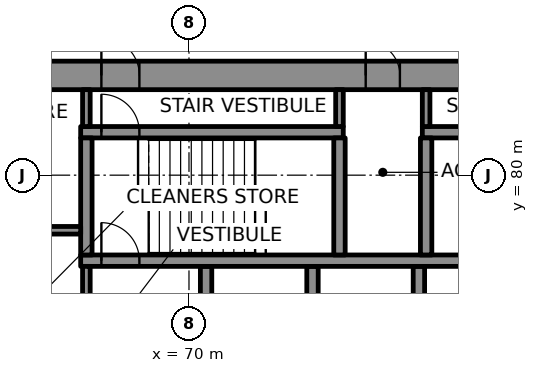
"""IFC4 building model, lengths in metres.
Left out: names, types, materials, properties, quantities, classifications, styles, units other than length and angle.
Written with IfcOpenShell. Run it as: python <this file> out.ifc"""

import sys

from ifc_helpers import new_model, si_unit, direction, frame, frame_2d, origin, place, context, subcontext, project, spatial, rectangle, extrude, element, fill, save


model = new_model("IFC4")
c1 = context("Model", 3, precision=1e-05, world=origin(), true_north=direction((0.0, 1.0)))
c2 = subcontext(c1, "Body", "Model", "MODEL_VIEW")
j1 = project(units=[si_unit("LENGTHUNIT", "METRE"), si_unit("PLANEANGLEUNIT", "RADIAN")], contexts=[c1])
p1 = place(None, origin())
s1 = spatial("IfcSite", under=j1, at=p1, CompositionType="ELEMENT")
p2 = place(p1, origin())
s2 = spatial("IfcBuilding", under=s1, at=p2, CompositionType="ELEMENT")
p3 = place(p2, frame((0.0, 0.0, 179.2)))
s3 = spatial("IfcBuildingStorey", under=s2, at=p3, CompositionType="ELEMENT", Elevation=179.2)
p4 = place(p3, frame((64.0, 82.625, 0.0), z_axis=(0.0, 0.0, 1.0), x_axis=(1.0, 0.0, 0.0)))
e1 = element("IfcWall", 1, at=p4, inside=s3, PredefinedType="SHEAR", context=c2, shape_type="SweptSolid", body=[
    extrude(rectangle(XDim=22.0, YDim=0.75, at=frame_2d((11.0, 0.0))), origin(), (0.0, 0.0, 1.0), 3.7),
])
p5 = place(p4, frame((3.695, 0.0, 0.0)))
e2 = element("IfcOpeningElement", 2, at=p5, cuts=e1, PredefinedType="OPENING", context=c2, shape_type="SweptSolid", body=[
    extrude(rectangle(XDim=1.0, YDim=2.1, at=frame_2d((0.5, 1.05))), frame((0.0, 0.385, 0.0), z_axis=(0.0, -1.0, 0.0), x_axis=(1.0, 0.0, 0.0)), (0.0, 0.0, 1.0), 0.77),
])
p6 = place(p4, frame((17.505, 0.0, 0.0)))
e3 = element("IfcOpeningElement", 3, at=p6, cuts=e1, PredefinedType="OPENING", context=c2, shape_type="SweptSolid", body=[
    extrude(rectangle(XDim=1.0, YDim=2.1, at=frame_2d((0.5, 1.05))), frame((0.0, 0.385, 0.0), z_axis=(0.0, -1.0, 0.0), x_axis=(1.0, 0.0, 0.0)), (0.0, 0.0, 1.0), 0.77),
])
p7 = place(p4, frame((10.65, 0.0, 0.0)))
e4 = element("IfcOpeningElement", 4, at=p7, cuts=e1, PredefinedType="OPENING", context=c2, shape_type="SweptSolid", body=[
    extrude(rectangle(XDim=0.9, YDim=2.1, at=frame_2d((0.45, 1.05))), frame((0.0, 0.385, 0.0), z_axis=(0.0, -1.0, 0.0), x_axis=(1.0, 0.0, 0.0)), (0.0, 0.0, 1.0), 0.77),
])
p8 = place(p3, frame((70.45, 75.0, 0.0), z_axis=(0.0, 0.0, 1.0), x_axis=(0.0, 1.0, 0.0)))
e5 = element("IfcWall", 5, at=p8, inside=s3, PredefinedType="SHEAR", context=c2, shape_type="SweptSolid", body=[
    extrude(rectangle(XDim=2.6, YDim=0.3, at=frame_2d((1.3, 0.0))), origin(), (0.0, 0.0, 1.0), 3.7),
])
p9 = place(p8, frame((0.15, 0.0, 0.0)))
e6 = element("IfcOpeningElement", 6, at=p9, cuts=e5, PredefinedType="OPENING", context=c2, shape_type="SweptSolid", body=[
    extrude(rectangle(XDim=1.1, YDim=2.1, at=frame_2d((0.55, 1.05))), frame((0.0, 0.16, 0.0), z_axis=(0.0, -1.0, 0.0), x_axis=(1.0, 0.0, 0.0)), (0.0, 0.0, 1.0), 0.32),
])
for number, where, z_axis, x_axis in (
    (7, (73.25, 75.0, 0.0), (0.0, 0.0, 1.0), (0.0, 1.0, 0.0)),
    (8, (76.05, 75.0, 0.0), (0.0, 0.0, 1.0), (0.0, 1.0, 0.0)),
):
    element("IfcWall", number, at=place(p3, frame(where, z_axis=z_axis, x_axis=x_axis)), inside=s3, PredefinedType="SHEAR", context=c2, shape_type="SweptSolid", body=[
        extrude(rectangle(XDim=2.6, YDim=0.3, at=frame_2d((1.3, 0.0))), origin(), (0.0, 0.0, 1.0), 3.7),
    ])
p10 = place(p3, frame((67.15, 77.75, 0.0), z_axis=(0.0, 0.0, 1.0), x_axis=(1.0, 0.0, 0.0)))
e9 = element("IfcWall", 9, at=p10, inside=s3, PredefinedType="SHEAR", context=c2, shape_type="SweptSolid", body=[
    extrude(rectangle(XDim=17.45, YDim=0.3, at=frame_2d((8.725, 0.0))), origin(), (0.0, 0.0, 1.0), 3.7),
])
p11 = place(p10, frame((0.545, 0.0, 0.0)))
e10 = element("IfcOpeningElement", 10, at=p11, cuts=e9, PredefinedType="OPENING", context=c2, shape_type="SweptSolid", body=[
    extrude(rectangle(XDim=1.0, YDim=2.1, at=frame_2d((0.5, 1.05))), frame((0.0, 0.16, 0.0), z_axis=(0.0, -1.0, 0.0), x_axis=(1.0, 0.0, 0.0)), (0.0, 0.0, 1.0), 0.32),
])
p12 = place(p3, frame((67.15, 81.13, 0.0), z_axis=(0.0, 0.0, 1.0), x_axis=(1.0, 0.0, 0.0)))
e11 = element("IfcWall", 11, at=p12, inside=s3, PredefinedType="SHEAR", context=c2, shape_type="SweptSolid", body=[
    extrude(rectangle(XDim=6.91, YDim=0.3, at=frame_2d((3.455, 0.0))), origin(), (0.0, 0.0, 1.0), 3.7),
])
p13 = place(p12, frame((0.545, 0.0, 0.0)))
e12 = element("IfcOpeningElement", 12, at=p13, cuts=e11, PredefinedType="OPENING", context=c2, shape_type="SweptSolid", body=[
    extrude(rectangle(XDim=1.0, YDim=2.1, at=frame_2d((0.5, 1.05))), frame((0.0, 0.16, 0.0), z_axis=(0.0, -1.0, 0.0), x_axis=(1.0, 0.0, 0.0)), (0.0, 0.0, 1.0), 0.32),
])
p14 = place(p3, frame((76.14, 81.13, 0.0), z_axis=(0.0, 0.0, 1.0), x_axis=(1.0, 0.0, 0.0)))
e13 = element("IfcWall", 13, at=p14, inside=s3, PredefinedType="SHEAR", context=c2, shape_type="SweptSolid", body=[
    extrude(rectangle(XDim=6.86, YDim=0.3, at=frame_2d((3.43, 0.0))), origin(), (0.0, 0.0, 1.0), 3.7),
])
p15 = place(p14, frame((5.365, 0.0, 0.0)))
e14 = element("IfcOpeningElement", 14, at=p15, cuts=e13, PredefinedType="OPENING", context=c2, shape_type="SweptSolid", body=[
    extrude(rectangle(XDim=1.0, YDim=2.1, at=frame_2d((0.5, 1.05))), frame((0.0, 0.16, 0.0), z_axis=(0.0, -1.0, 0.0), x_axis=(1.0, 0.0, 0.0)), (0.0, 0.0, 1.0), 0.32),
])
for number, where, z_axis, x_axis in (
    (15, (67.3, 77.9, 0.0), (0.0, 0.0, 1.0), (0.0, 1.0, 0.0)),
    (16, (73.96, 77.9, 0.0), (0.0, 0.0, 1.0), (0.0, 1.0, 0.0)),
    (17, (76.24, 77.9, 0.0), (0.0, 0.0, 1.0), (0.0, 1.0, 0.0)),
):
    element("IfcWall", number, at=place(p3, frame(where, z_axis=z_axis, x_axis=x_axis)), inside=s3, PredefinedType="SHEAR", context=c2, shape_type="SweptSolid", body=[
        extrude(rectangle(XDim=3.08, YDim=0.3, at=frame_2d((1.54, 0.0))), origin(), (0.0, 0.0, 1.0), 3.7),
    ])
p16 = place(p3, frame((64.75, 78.55, 0.0), z_axis=(0.0, 0.0, 1.0), x_axis=(1.0, 0.0, 0.0)))
e18 = element("IfcWall", 18, at=p16, inside=s3, PredefinedType="PARTITIONING", context=c2, shape_type="SweptSolid", body=[
    extrude(rectangle(XDim=2.4, YDim=0.2, at=frame_2d((1.2, 0.0))), origin(), (0.0, 0.0, 1.0), 3.7),
])
p17 = place(p3, frame((67.3, 71.85, 0.0), z_axis=(0.0, 0.0, 1.0), x_axis=(0.0, 1.0, 0.0)))
e19 = element("IfcWall", 19, at=p17, inside=s3, PredefinedType="PARTITIONING", context=c2, shape_type="SweptSolid", body=[
    extrude(rectangle(XDim=5.75, YDim=0.2, at=frame_2d((2.875, 0.0))), origin(), (0.0, 0.0, 1.0), 3.7),
])
p18 = place(p17, frame((0.85, 0.0, 0.0)))
e20 = element("IfcOpeningElement", 20, at=p18, cuts=e19, PredefinedType="OPENING", context=c2, shape_type="SweptSolid", body=[
    extrude(rectangle(XDim=1.2, YDim=2.1, at=frame_2d((0.6, 1.05))), frame((0.0, 0.11, 0.0), z_axis=(0.0, -1.0, 0.0), x_axis=(1.0, 0.0, 0.0)), (0.0, 0.0, 1.0), 0.22),
])
for number, where, z_axis, x_axis in (
    (21, (67.3, 81.28, 0.0), (0.0, 0.0, 1.0), (0.0, 1.0, 0.0)),
    (22, (73.96, 81.28, 0.0), (0.0, 0.0, 1.0), (0.0, 1.0, 0.0)),
    (23, (76.24, 81.28, 0.0), (0.0, 0.0, 1.0), (0.0, 1.0, 0.0)),
):
    element("IfcWall", number, at=place(p3, frame(where, z_axis=z_axis, x_axis=x_axis)), inside=s3, PredefinedType="PARTITIONING", context=c2, shape_type="SweptSolid", body=[
        extrude(rectangle(XDim=0.97, YDim=0.2, at=frame_2d((0.485, 0.0))), origin(), (0.0, 0.0, 1.0), 3.7),
    ])
p19 = place(p11, origin())
e24 = element("IfcDoor", 24, at=p19, inside=s3, OperationType="SINGLE_SWING_LEFT", PredefinedType="DOOR", context=c2, shape_type="SweptSolid", body=[
    extrude(rectangle(XDim=1.0, YDim=2.1, at=frame_2d((0.5, 1.05))), frame((0.0, 0.025, 0.0), z_axis=(0.0, -1.0, 0.0), x_axis=(1.0, 0.0, 0.0)), (0.0, 0.0, 1.0), 0.05),
])
fill(e10, e24)
p20 = place(p13, origin())
e25 = element("IfcDoor", 25, at=p20, inside=s3, OperationType="SINGLE_SWING_RIGHT", PredefinedType="DOOR", context=c2, shape_type="SweptSolid", body=[
    extrude(rectangle(XDim=1.0, YDim=2.1, at=frame_2d((0.5, 1.05))), frame((0.0, 0.025, 0.0), z_axis=(0.0, -1.0, 0.0), x_axis=(1.0, 0.0, 0.0)), (0.0, 0.0, 1.0), 0.05),
])
fill(e12, e25)
p21 = place(p5, origin())
e26 = element("IfcDoor", 26, at=p21, inside=s3, OperationType="SINGLE_SWING_LEFT", PredefinedType="DOOR", context=c2, shape_type="SweptSolid", body=[
    extrude(rectangle(XDim=1.0, YDim=2.1, at=frame_2d((0.5, 1.05))), frame((0.0, 0.095, 0.0), z_axis=(0.0, -1.0, 0.0), x_axis=(1.0, 0.0, 0.0)), (0.0, 0.0, 1.0), 0.19),
])
fill(e2, e26)
p22 = place(p7, origin())
e27 = element("IfcDoor", 27, at=p22, inside=s3, OperationType="SINGLE_SWING_RIGHT", PredefinedType="DOOR", context=c2, shape_type="SweptSolid", body=[
    extrude(rectangle(XDim=0.9, YDim=2.1, at=frame_2d((0.45, 1.05))), frame((0.0, 0.095, 0.0), z_axis=(0.0, -1.0, 0.0), x_axis=(1.0, 0.0, 0.0)), (0.0, 0.0, 1.0), 0.19),
])
fill(e4, e27)
save(model, sys.argv[1])
